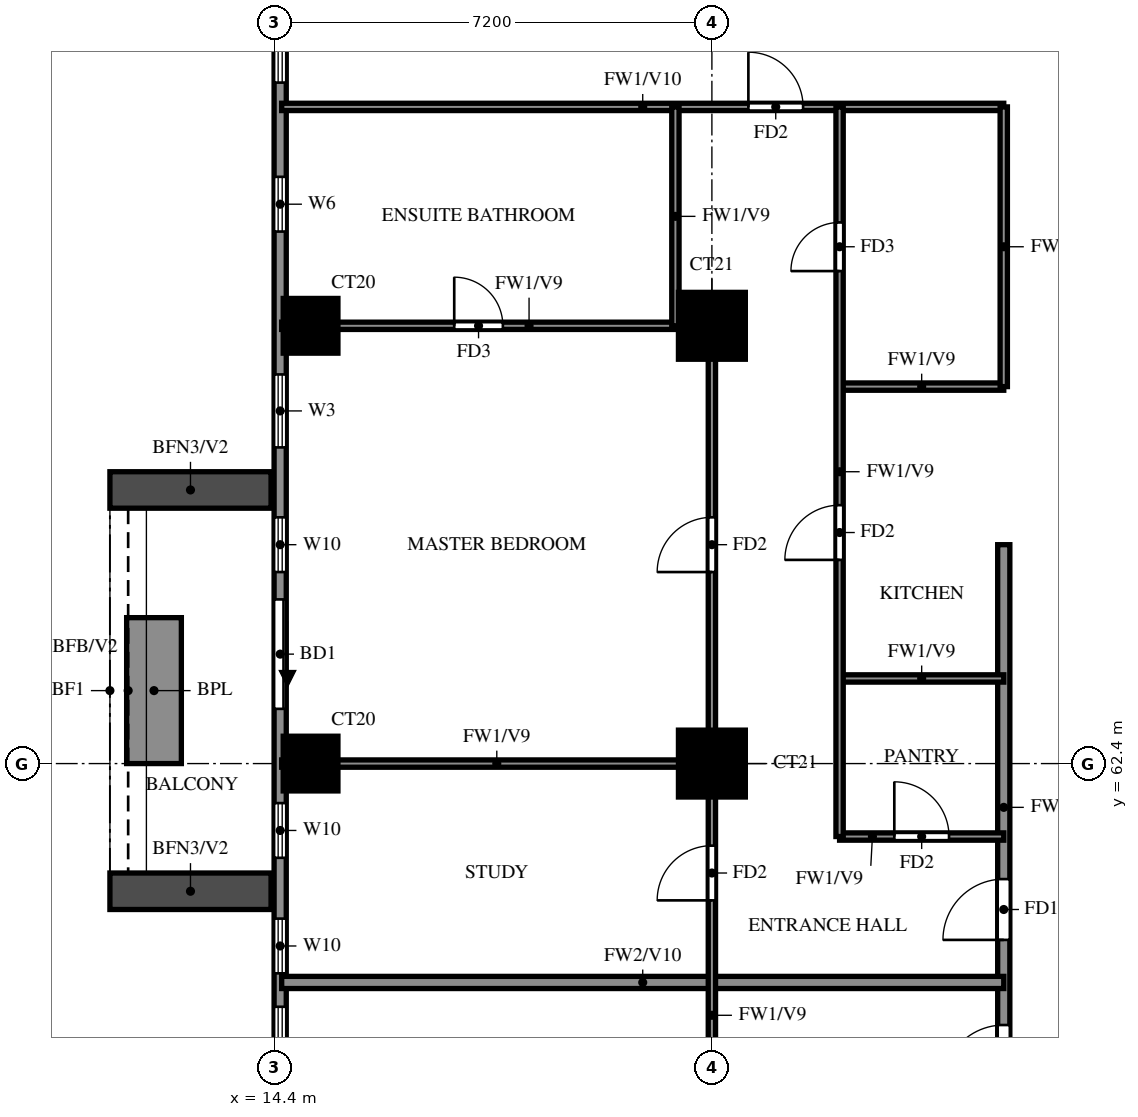
"""IFC4 building model, lengths in metres.
Left out: names, types, materials, properties, quantities, classifications, styles, units other than length and angle.
Written with IfcOpenShell. Run it as: python <this file> out.ifc"""

import sys

from ifc_helpers import new_model, si_unit, direction, frame, frame_2d, origin, origin_2d, place, context, subcontext, project, spatial, rectangle, extrude, source, transform, mapped, element, fill, save


model = new_model("IFC4")
c1 = context("Model", 3, precision=1e-05, world=origin(), true_north=direction((0.0, 1.0)))
c2 = subcontext(c1, "Body", "Model", "MODEL_VIEW")
j1 = project(units=[si_unit("LENGTHUNIT", "METRE"), si_unit("PLANEANGLEUNIT", "RADIAN")], contexts=[c1])
p1 = place(None, origin())
s1 = spatial("IfcSite", under=j1, at=p1, CompositionType="ELEMENT")
p2 = place(p1, origin())
s2 = spatial("IfcBuilding", under=s1, at=p2, CompositionType="ELEMENT")
p3 = place(p2, frame((0.0, 0.0, 134.0)))
s3 = spatial("IfcBuildingStorey", under=s2, at=p3, CompositionType="ELEMENT", Elevation=134.0)
m1 = source(origin(), c2, "Body", "SweptSolid", [
    extrude(rectangle(XDim=0.9, YDim=0.9, at=origin_2d()), origin(), (0.0, 0.0, 1.0), 3.15),
])
p4 = place(p3, frame((15.0, 62.4, 0.0), z_axis=(0.0, 0.0, 1.0), x_axis=(1.0, 0.0, 0.0)))
e1 = element("IfcColumn", 1, at=p4, inside=s3, PredefinedType="COLUMN", context=c2, shape_type="MappedRepresentation", body=[
    mapped(m1, transform((0.0, 0.0, 0.0))),
])
m2 = source(origin(), c2, "Body", "SweptSolid", [
    extrude(rectangle(XDim=1.1, YDim=1.1, at=origin_2d()), origin(), (0.0, 0.0, 1.0), 3.15),
])
p5 = place(p3, frame((21.6, 62.4, 0.0), z_axis=(0.0, 0.0, 1.0), x_axis=(1.0, 0.0, 0.0)))
e2 = element("IfcColumn", 2, at=p5, inside=s3, PredefinedType="COLUMN", context=c2, shape_type="MappedRepresentation", body=[
    mapped(m2, transform((0.0, 0.0, 0.0))),
])
p6 = place(p3, frame((15.0, 69.6, 0.0), z_axis=(0.0, 0.0, 1.0), x_axis=(1.0, 0.0, 0.0)))
e3 = element("IfcColumn", 3, at=p6, inside=s3, PredefinedType="COLUMN", context=c2, shape_type="MappedRepresentation", body=[
    mapped(m1, transform((0.0, 0.0, 0.0))),
])
p7 = place(p3, frame((21.6, 69.6, 0.0), z_axis=(0.0, 0.0, 1.0), x_axis=(1.0, 0.0, 0.0)))
e4 = element("IfcColumn", 4, at=p7, inside=s3, PredefinedType="COLUMN", context=c2, shape_type="MappedRepresentation", body=[
    mapped(m2, transform((0.0, 0.0, 0.0))),
])
p8 = place(p3, frame((14.5, 76.6, 0.0), z_axis=(0.0, 0.0, 1.0), x_axis=(0.0, -1.0, 0.0)))
e5 = element("IfcWall", 5, at=p8, inside=s3, PredefinedType="SOLIDWALL", context=c2, shape_type="SweptSolid", body=[
    extrude(rectangle(XDim=33.4, YDim=0.2, at=frame_2d((16.7, 0.0))), origin(), (0.0, 0.0, 1.0), 3.15),
])
p9 = place(p8, frame((11.5, 0.0, 0.0)))
e6 = element("IfcOpeningElement", 6, at=p9, cuts=e5, PredefinedType="OPENING", context=c2, shape_type="SweptSolid", body=[
    extrude(rectangle(XDim=1.8, YDim=2.4, at=frame_2d((0.9, 1.2))), frame((0.0, 0.11, 0.0), z_axis=(0.0, -1.0, 0.0), x_axis=(1.0, 0.0, 0.0)), (0.0, 0.0, 1.0), 0.22),
])
p10 = place(p8, frame((25.9, 0.0, 0.0)))
e7 = element("IfcOpeningElement", 7, at=p10, cuts=e5, PredefinedType="OPENING", context=c2, shape_type="SweptSolid", body=[
    extrude(rectangle(XDim=1.8, YDim=2.4, at=frame_2d((0.9, 1.2))), frame((0.0, 0.11, 0.0), z_axis=(0.0, -1.0, 0.0), x_axis=(1.0, 0.0, 0.0)), (0.0, 0.0, 1.0), 0.22),
])
p11 = place(p8, frame((29.25, 0.0, 0.6)))
e8 = element("IfcOpeningElement", 8, at=p11, cuts=e5, PredefinedType="OPENING", context=c2, shape_type="SweptSolid", body=[
    extrude(rectangle(XDim=0.9, YDim=2.4, at=frame_2d((0.45, 1.2))), frame((0.0, 0.11, 0.0), z_axis=(0.0, -1.0, 0.0), x_axis=(1.0, 0.0, 0.0)), (0.0, 0.0, 1.0), 0.22),
])
p12 = place(p8, frame((31.2, 0.0, 0.6)))
e9 = element("IfcOpeningElement", 9, at=p12, cuts=e5, PredefinedType="OPENING", context=c2, shape_type="SweptSolid", body=[
    extrude(rectangle(XDim=1.8, YDim=2.4, at=frame_2d((0.9, 1.2))), frame((0.0, 0.11, 0.0), z_axis=(0.0, -1.0, 0.0), x_axis=(1.0, 0.0, 0.0)), (0.0, 0.0, 1.0), 0.22),
])
p13 = place(p8, frame((18.2, 0.0, 0.6)))
e10 = element("IfcOpeningElement", 10, at=p13, cuts=e5, PredefinedType="OPENING", context=c2, shape_type="SweptSolid", body=[
    extrude(rectangle(XDim=2.4, YDim=2.4, at=frame_2d((1.2, 1.2))), frame((0.0, 0.11, 0.0), z_axis=(0.0, -1.0, 0.0), x_axis=(1.0, 0.0, 0.0)), (0.0, 0.0, 1.0), 0.22),
])
p14 = place(p8, frame((22.2, 0.0, 0.6)))
e11 = element("IfcOpeningElement", 11, at=p14, cuts=e5, PredefinedType="OPENING", context=c2, shape_type="SweptSolid", body=[
    extrude(rectangle(XDim=1.2, YDim=2.4, at=frame_2d((0.6, 1.2))), frame((0.0, 0.11, 0.0), z_axis=(0.0, -1.0, 0.0), x_axis=(1.0, 0.0, 0.0)), (0.0, 0.0, 1.0), 0.22),
])
p15 = place(p8, frame((14.85, 0.0, 0.6)))
e12 = element("IfcOpeningElement", 12, at=p15, cuts=e5, PredefinedType="OPENING", context=c2, shape_type="SweptSolid", body=[
    extrude(rectangle(XDim=0.9, YDim=2.4, at=frame_2d((0.45, 1.2))), frame((0.0, 0.11, 0.0), z_axis=(0.0, -1.0, 0.0), x_axis=(1.0, 0.0, 0.0)), (0.0, 0.0, 1.0), 0.22),
])
p16 = place(p8, frame((16.75, 0.0, 0.6)))
e13 = element("IfcOpeningElement", 13, at=p16, cuts=e5, PredefinedType="OPENING", context=c2, shape_type="SweptSolid", body=[
    extrude(rectangle(XDim=0.9, YDim=2.4, at=frame_2d((0.45, 1.2))), frame((0.0, 0.11, 0.0), z_axis=(0.0, -1.0, 0.0), x_axis=(1.0, 0.0, 0.0)), (0.0, 0.0, 1.0), 0.22),
])
p17 = place(p8, frame((7.8, 0.0, 0.6)))
e14 = element("IfcOpeningElement", 14, at=p17, cuts=e5, PredefinedType="OPENING", context=c2, shape_type="SweptSolid", body=[
    extrude(rectangle(XDim=1.2, YDim=2.4, at=frame_2d((0.6, 1.2))), frame((0.0, 0.11, 0.0), z_axis=(0.0, -1.0, 0.0), x_axis=(1.0, 0.0, 0.0)), (0.0, 0.0, 1.0), 0.22),
])
p18 = place(p8, frame((10.15, 0.0, 0.6)))
e15 = element("IfcOpeningElement", 15, at=p18, cuts=e5, PredefinedType="OPENING", context=c2, shape_type="SweptSolid", body=[
    extrude(rectangle(XDim=0.9, YDim=2.4, at=frame_2d((0.45, 1.2))), frame((0.0, 0.11, 0.0), z_axis=(0.0, -1.0, 0.0), x_axis=(1.0, 0.0, 0.0)), (0.0, 0.0, 1.0), 0.22),
])
p19 = place(p8, frame((4.55, 0.0, 1.5)))
e16 = element("IfcOpeningElement", 16, at=p19, cuts=e5, PredefinedType="OPENING", context=c2, shape_type="SweptSolid", body=[
    extrude(rectangle(XDim=0.9, YDim=0.9, at=frame_2d((0.45, 0.45))), frame((0.0, 0.11, 0.0), z_axis=(0.0, -1.0, 0.0), x_axis=(1.0, 0.0, 0.0)), (0.0, 0.0, 1.0), 0.22),
])
p20 = place(p8, frame((0.6, 0.0, 0.6)))
e17 = element("IfcOpeningElement", 17, at=p20, cuts=e5, PredefinedType="OPENING", context=c2, shape_type="SweptSolid", body=[
    extrude(rectangle(XDim=2.4, YDim=2.4, at=frame_2d((1.2, 1.2))), frame((0.0, 0.11, 0.0), z_axis=(0.0, -1.0, 0.0), x_axis=(1.0, 0.0, 0.0)), (0.0, 0.0, 1.0), 0.22),
])
for number, where, z_axis, x_axis in (
    (18, (14.35, 66.9, 0.0), (0.0, 0.0, 1.0), (-1.0, 0.0, 0.0)),
    (19, (14.35, 60.3, 0.0), (0.0, 0.0, 1.0), (-1.0, 0.0, 0.0)),
):
    element("IfcWall", number, at=place(p3, frame(where, z_axis=z_axis, x_axis=x_axis)), inside=s3, PredefinedType="SOLIDWALL", context=c2, shape_type="SweptSolid", body=[
        extrude(rectangle(XDim=2.65, YDim=0.6, at=frame_2d((1.325, 0.0))), origin(), (0.0, 0.0, 1.0), 2.8),
    ])
p21 = place(p3, frame((12.425, 64.8, 0.0), z_axis=(0.0, 0.0, 1.0), x_axis=(0.0, -1.0, 0.0)))
e20 = element("IfcWall", 20, at=p21, inside=s3, PredefinedType="SOLIDWALL", context=c2, shape_type="SweptSolid", body=[
    extrude(rectangle(XDim=2.4, YDim=0.9, at=frame_2d((1.2, 0.0))), origin(), (0.0, 0.0, 1.0), 0.9),
])
p22 = place(p3, frame((26.4, 56.4, 0.0), z_axis=(0.0, 0.0, 1.0), x_axis=(0.0, 1.0, 0.0)))
e21 = element("IfcWall", 21, at=p22, inside=s3, PredefinedType="SOLIDWALL", context=c2, shape_type="SweptSolid", body=[
    extrude(rectangle(XDim=9.6, YDim=0.2, at=frame_2d((4.8, 0.0))), origin(), (0.0, 0.0, 1.0), 3.15),
])
p23 = place(p22, frame((0.7, 0.0, 0.0)))
e22 = element("IfcOpeningElement", 22, at=p23, cuts=e21, PredefinedType="OPENING", context=c2, shape_type="SweptSolid", body=[
    extrude(rectangle(XDim=1.0, YDim=2.1, at=frame_2d((0.5, 1.05))), frame((0.0, 0.11, 0.0), z_axis=(0.0, -1.0, 0.0), x_axis=(1.0, 0.0, 0.0)), (0.0, 0.0, 1.0), 0.22),
])
p24 = place(p22, frame((3.1, 0.0, 0.0)))
e23 = element("IfcOpeningElement", 23, at=p24, cuts=e21, PredefinedType="OPENING", context=c2, shape_type="SweptSolid", body=[
    extrude(rectangle(XDim=1.0, YDim=2.1, at=frame_2d((0.5, 1.05))), frame((0.0, 0.11, 0.0), z_axis=(0.0, -1.0, 0.0), x_axis=(1.0, 0.0, 0.0)), (0.0, 0.0, 1.0), 0.22),
])
p25 = place(p3, frame((14.525, 58.8, 0.0), z_axis=(0.0, 0.0, 1.0), x_axis=(1.0, 0.0, 0.0)))
e24 = element("IfcWall", 24, at=p25, inside=s3, PredefinedType="SOLIDWALL", context=c2, shape_type="SweptSolid", body=[
    extrude(rectangle(XDim=11.875, YDim=0.2, at=frame_2d((5.938, 0.0))), origin(), (0.0, 0.0, 1.0), 2.25),
])
p26 = place(p3, frame((23.7, 61.2, 0.0), z_axis=(0.0, 0.0, 1.0), x_axis=(1.0, 0.0, 0.0)))
e25 = element("IfcWall", 25, at=p26, inside=s3, PredefinedType="PARTITIONING", context=c2, shape_type="SweptSolid", body=[
    extrude(rectangle(XDim=2.7, YDim=0.12, at=frame_2d((1.35, 0.0))), origin(), (0.0, 0.0, 1.0), 3.15),
])
p27 = place(p26, frame((0.9, 0.0, 0.0)))
e26 = element("IfcOpeningElement", 26, at=p27, cuts=e25, PredefinedType="OPENING", context=c2, shape_type="SweptSolid", body=[
    extrude(rectangle(XDim=0.9, YDim=2.1, at=frame_2d((0.45, 1.05))), frame((0.0, 0.07, 0.0), z_axis=(0.0, -1.0, 0.0), x_axis=(1.0, 0.0, 0.0)), (0.0, 0.0, 1.0), 0.14),
])
p28 = place(p3, frame((14.525, 62.4, 0.0), z_axis=(0.0, 0.0, 1.0), x_axis=(1.0, 0.0, 0.0)))
e27 = element("IfcWall", 27, at=p28, inside=s3, PredefinedType="PARTITIONING", context=c2, shape_type="SweptSolid", body=[
    extrude(rectangle(XDim=7.075, YDim=0.12, at=frame_2d((3.538, 0.0))), origin(), (0.0, 0.0, 1.0), 3.15),
])
for number, where, z_axis, x_axis in (
    (28, (23.7, 63.8, 0.0), (0.0, 0.0, 1.0), (1.0, 0.0, 0.0)),
    (29, (23.7, 68.6, 0.0), (0.0, 0.0, 1.0), (1.0, 0.0, 0.0)),
):
    element("IfcWall", number, at=place(p3, frame(where, z_axis=z_axis, x_axis=x_axis)), inside=s3, PredefinedType="PARTITIONING", context=c2, shape_type="SweptSolid", body=[
        extrude(rectangle(XDim=2.7, YDim=0.12, at=frame_2d((1.35, 0.0))), origin(), (0.0, 0.0, 1.0), 3.15),
    ])
p29 = place(p3, frame((14.525, 69.6, 0.0), z_axis=(0.0, 0.0, 1.0), x_axis=(1.0, 0.0, 0.0)))
e30 = element("IfcWall", 30, at=p29, inside=s3, PredefinedType="PARTITIONING", context=c2, shape_type="SweptSolid", body=[
    extrude(rectangle(XDim=7.075, YDim=0.12, at=frame_2d((3.538, 0.0))), origin(), (0.0, 0.0, 1.0), 3.15),
])
p30 = place(p29, frame((2.837, 0.0, 0.0)))
e31 = element("IfcOpeningElement", 31, at=p30, cuts=e30, PredefinedType="OPENING", context=c2, shape_type="SweptSolid", body=[
    extrude(rectangle(XDim=0.8, YDim=2.1, at=frame_2d((0.4, 1.05))), frame((0.0, 0.07, 0.0), z_axis=(0.0, -1.0, 0.0), x_axis=(1.0, 0.0, 0.0)), (0.0, 0.0, 1.0), 0.14),
])
p31 = place(p3, frame((14.525, 73.2, 0.0), z_axis=(0.0, 0.0, 1.0), x_axis=(1.0, 0.0, 0.0)))
e32 = element("IfcWall", 32, at=p31, inside=s3, PredefinedType="PARTITIONING", context=c2, shape_type="SweptSolid", body=[
    extrude(rectangle(XDim=11.875, YDim=0.12, at=frame_2d((5.938, 0.0))), origin(), (0.0, 0.0, 1.0), 2.25),
])
p32 = place(p31, frame((7.675, 0.0, 0.0)))
e33 = element("IfcOpeningElement", 33, at=p32, cuts=e32, PredefinedType="OPENING", context=c2, shape_type="SweptSolid", body=[
    extrude(rectangle(XDim=0.9, YDim=2.1, at=frame_2d((0.45, 1.05))), frame((0.0, 0.07, 0.0), z_axis=(0.0, -1.0, 0.0), x_axis=(1.0, 0.0, 0.0)), (0.0, 0.0, 1.0), 0.14),
])
p33 = place(p3, frame((21.0, 69.6, 0.0), z_axis=(0.0, 0.0, 1.0), x_axis=(0.0, 1.0, 0.0)))
e34 = element("IfcWall", 34, at=p33, inside=s3, PredefinedType="PARTITIONING", context=c2, shape_type="SweptSolid", body=[
    extrude(rectangle(XDim=3.6, YDim=0.12, at=frame_2d((1.8, 0.0))), origin(), (0.0, 0.0, 1.0), 3.15),
])
p34 = place(p3, frame((21.6, 48.0, 0.0), z_axis=(0.0, 0.0, 1.0), x_axis=(0.0, 1.0, 0.0)))
e35 = element("IfcWall", 35, at=p34, inside=s3, PredefinedType="PARTITIONING", context=c2, shape_type="SweptSolid", body=[
    extrude(rectangle(XDim=21.6, YDim=0.12, at=frame_2d((10.8, 0.0))), origin(), (0.0, 0.0, 1.0), 3.15),
])
p35 = place(p34, frame((1.35, 0.0, 0.0)))
e36 = element("IfcOpeningElement", 36, at=p35, cuts=e35, PredefinedType="OPENING", context=c2, shape_type="SweptSolid", body=[
    extrude(rectangle(XDim=0.9, YDim=2.1, at=frame_2d((0.45, 1.05))), frame((0.0, 0.07, 0.0), z_axis=(0.0, -1.0, 0.0), x_axis=(1.0, 0.0, 0.0)), (0.0, 0.0, 1.0), 0.14),
])
p36 = place(p34, frame((7.95, 0.0, 0.0)))
e37 = element("IfcOpeningElement", 37, at=p36, cuts=e35, PredefinedType="OPENING", context=c2, shape_type="SweptSolid", body=[
    extrude(rectangle(XDim=1.5, YDim=2.1, at=frame_2d((0.75, 1.05))), frame((0.0, 0.07, 0.0), z_axis=(0.0, -1.0, 0.0), x_axis=(1.0, 0.0, 0.0)), (0.0, 0.0, 1.0), 0.14),
])
p37 = place(p34, frame((12.15, 0.0, 0.0)))
e38 = element("IfcOpeningElement", 38, at=p37, cuts=e35, PredefinedType="OPENING", context=c2, shape_type="SweptSolid", body=[
    extrude(rectangle(XDim=0.9, YDim=2.1, at=frame_2d((0.45, 1.05))), frame((0.0, 0.07, 0.0), z_axis=(0.0, -1.0, 0.0), x_axis=(1.0, 0.0, 0.0)), (0.0, 0.0, 1.0), 0.14),
])
p38 = place(p34, frame((17.55, 0.0, 0.0)))
e39 = element("IfcOpeningElement", 39, at=p38, cuts=e35, PredefinedType="OPENING", context=c2, shape_type="SweptSolid", body=[
    extrude(rectangle(XDim=0.9, YDim=2.1, at=frame_2d((0.45, 1.05))), frame((0.0, 0.07, 0.0), z_axis=(0.0, -1.0, 0.0), x_axis=(1.0, 0.0, 0.0)), (0.0, 0.0, 1.0), 0.14),
])
p39 = place(p3, frame((23.7, 61.2, 0.0), z_axis=(0.0, 0.0, 1.0), x_axis=(0.0, 1.0, 0.0)))
e40 = element("IfcWall", 40, at=p39, inside=s3, PredefinedType="PARTITIONING", context=c2, shape_type="SweptSolid", body=[
    extrude(rectangle(XDim=12.0, YDim=0.12, at=frame_2d((6.0, 0.0))), origin(), (0.0, 0.0, 1.0), 3.15),
])
p40 = place(p39, frame((4.55, 0.0, 0.0)))
e41 = element("IfcOpeningElement", 41, at=p40, cuts=e40, PredefinedType="OPENING", context=c2, shape_type="SweptSolid", body=[
    extrude(rectangle(XDim=0.9, YDim=2.1, at=frame_2d((0.45, 1.05))), frame((0.0, 0.07, 0.0), z_axis=(0.0, -1.0, 0.0), x_axis=(1.0, 0.0, 0.0)), (0.0, 0.0, 1.0), 0.14),
])
p41 = place(p39, frame((9.3, 0.0, 0.0)))
e42 = element("IfcOpeningElement", 42, at=p41, cuts=e40, PredefinedType="OPENING", context=c2, shape_type="SweptSolid", body=[
    extrude(rectangle(XDim=0.8, YDim=2.1, at=frame_2d((0.4, 1.05))), frame((0.0, 0.07, 0.0), z_axis=(0.0, -1.0, 0.0), x_axis=(1.0, 0.0, 0.0)), (0.0, 0.0, 1.0), 0.14),
])
p42 = place(p3, frame((26.4, 68.6, 0.0), z_axis=(0.0, 0.0, 1.0), x_axis=(0.0, 1.0, 0.0)))
e43 = element("IfcWall", 43, at=p42, inside=s3, PredefinedType="PARTITIONING", context=c2, shape_type="SweptSolid", body=[
    extrude(rectangle(XDim=4.6, YDim=0.12, at=frame_2d((2.3, 0.0))), origin(), (0.0, 0.0, 1.0), 3.15),
])
p43 = place(p9, origin())
e44 = element("IfcDoor", 44, at=p43, inside=s3, OperationType="DOUBLE_DOOR_SLIDING", PredefinedType="DOOR", context=c2, shape_type="SweptSolid", body=[
    extrude(rectangle(XDim=1.8, YDim=2.4, at=frame_2d((0.9, 1.2))), frame((0.0, 0.025, 0.0), z_axis=(0.0, -1.0, 0.0), x_axis=(1.0, 0.0, 0.0)), (0.0, 0.0, 1.0), 0.05),
])
fill(e6, e44)
p44 = place(p13, origin())
e45 = element("IfcWindow", 45, at=p44, inside=s3, PartitioningType="DOUBLE_PANEL_VERTICAL", PredefinedType="WINDOW", context=c2, shape_type="SweptSolid", body=[
    extrude(rectangle(XDim=2.4, YDim=2.4, at=frame_2d((1.2, 1.2))), frame((0.0, 0.03, 0.0), z_axis=(0.0, -1.0, 0.0), x_axis=(1.0, 0.0, 0.0)), (0.0, 0.0, 1.0), 0.06),
])
fill(e10, e45)
p45 = place(p15, origin())
e46 = element("IfcWindow", 46, at=p45, inside=s3, PartitioningType="SINGLE_PANEL", PredefinedType="WINDOW", context=c2, shape_type="SweptSolid", body=[
    extrude(rectangle(XDim=0.9, YDim=2.4, at=frame_2d((0.45, 1.2))), frame((0.0, 0.03, 0.0), z_axis=(0.0, -1.0, 0.0), x_axis=(1.0, 0.0, 0.0)), (0.0, 0.0, 1.0), 0.06),
])
fill(e12, e46)
p46 = place(p16, origin())
e47 = element("IfcWindow", 47, at=p46, inside=s3, PartitioningType="SINGLE_PANEL", PredefinedType="WINDOW", context=c2, shape_type="SweptSolid", body=[
    extrude(rectangle(XDim=0.9, YDim=2.4, at=frame_2d((0.45, 1.2))), frame((0.0, 0.03, 0.0), z_axis=(0.0, -1.0, 0.0), x_axis=(1.0, 0.0, 0.0)), (0.0, 0.0, 1.0), 0.06),
])
fill(e13, e47)
p47 = place(p17, origin())
e48 = element("IfcWindow", 48, at=p47, inside=s3, PartitioningType="SINGLE_PANEL", PredefinedType="WINDOW", context=c2, shape_type="SweptSolid", body=[
    extrude(rectangle(XDim=1.2, YDim=2.4, at=frame_2d((0.6, 1.2))), frame((0.0, 0.03, 0.0), z_axis=(0.0, -1.0, 0.0), x_axis=(1.0, 0.0, 0.0)), (0.0, 0.0, 1.0), 0.06),
])
fill(e14, e48)
p48 = place(p18, origin())
e49 = element("IfcWindow", 49, at=p48, inside=s3, PartitioningType="SINGLE_PANEL", PredefinedType="WINDOW", context=c2, shape_type="SweptSolid", body=[
    extrude(rectangle(XDim=0.9, YDim=2.4, at=frame_2d((0.45, 1.2))), frame((0.0, 0.03, 0.0), z_axis=(0.0, -1.0, 0.0), x_axis=(1.0, 0.0, 0.0)), (0.0, 0.0, 1.0), 0.06),
])
fill(e15, e49)
p49 = place(p19, origin())
e50 = element("IfcWindow", 50, at=p49, inside=s3, PartitioningType="SINGLE_PANEL", PredefinedType="WINDOW", context=c2, shape_type="SweptSolid", body=[
    extrude(rectangle(XDim=0.9, YDim=0.9, at=frame_2d((0.45, 0.45))), frame((0.0, 0.03, 0.0), z_axis=(0.0, -1.0, 0.0), x_axis=(1.0, 0.0, 0.0)), (0.0, 0.0, 1.0), 0.06),
])
fill(e16, e50)
p50 = place(p20, origin())
e51 = element("IfcWindow", 51, at=p50, inside=s3, PartitioningType="DOUBLE_PANEL_VERTICAL", PredefinedType="WINDOW", context=c2, shape_type="SweptSolid", body=[
    extrude(rectangle(XDim=2.4, YDim=2.4, at=frame_2d((1.2, 1.2))), frame((0.0, 0.03, 0.0), z_axis=(0.0, -1.0, 0.0), x_axis=(1.0, 0.0, 0.0)), (0.0, 0.0, 1.0), 0.06),
])
fill(e17, e51)
p51 = place(p23, origin())
e52 = element("IfcDoor", 52, at=p51, inside=s3, OperationType="SINGLE_SWING_LEFT", PredefinedType="DOOR", context=c2, shape_type="SweptSolid", body=[
    extrude(rectangle(XDim=1.0, YDim=2.1, at=frame_2d((0.5, 1.05))), frame((0.0, 0.025, 0.0), z_axis=(0.0, -1.0, 0.0), x_axis=(1.0, 0.0, 0.0)), (0.0, 0.0, 1.0), 0.05),
])
fill(e22, e52)
p52 = place(p24, origin())
e53 = element("IfcDoor", 53, at=p52, inside=s3, OperationType="SINGLE_SWING_LEFT", PredefinedType="DOOR", context=c2, shape_type="SweptSolid", body=[
    extrude(rectangle(XDim=1.0, YDim=2.1, at=frame_2d((0.5, 1.05))), frame((0.0, 0.025, 0.0), z_axis=(0.0, -1.0, 0.0), x_axis=(1.0, 0.0, 0.0)), (0.0, 0.0, 1.0), 0.05),
])
fill(e23, e53)
p53 = place(p37, origin())
e54 = element("IfcDoor", 54, at=p53, inside=s3, OperationType="SINGLE_SWING_LEFT", PredefinedType="DOOR", context=c2, shape_type="SweptSolid", body=[
    extrude(rectangle(XDim=0.9, YDim=2.1, at=frame_2d((0.45, 1.05))), frame((0.0, 0.025, 0.0), z_axis=(0.0, -1.0, 0.0), x_axis=(1.0, 0.0, 0.0)), (0.0, 0.0, 1.0), 0.05),
])
fill(e38, e54)
p54 = place(p38, origin())
e55 = element("IfcDoor", 55, at=p54, inside=s3, OperationType="SINGLE_SWING_RIGHT", PredefinedType="DOOR", context=c2, shape_type="SweptSolid", body=[
    extrude(rectangle(XDim=0.9, YDim=2.1, at=frame_2d((0.45, 1.05))), frame((0.0, 0.025, 0.0), z_axis=(0.0, -1.0, 0.0), x_axis=(1.0, 0.0, 0.0)), (0.0, 0.0, 1.0), 0.05),
])
fill(e39, e55)
p55 = place(p30, origin())
e56 = element("IfcDoor", 56, at=p55, inside=s3, OperationType="SINGLE_SWING_LEFT", PredefinedType="DOOR", context=c2, shape_type="SweptSolid", body=[
    extrude(rectangle(XDim=0.8, YDim=2.1, at=frame_2d((0.4, 1.05))), frame((0.0, 0.025, 0.0), z_axis=(0.0, -1.0, 0.0), x_axis=(1.0, 0.0, 0.0)), (0.0, 0.0, 1.0), 0.05),
])
fill(e31, e56)
p56 = place(p32, origin())
e57 = element("IfcDoor", 57, at=p56, inside=s3, OperationType="SINGLE_SWING_LEFT", PredefinedType="DOOR", context=c2, shape_type="SweptSolid", body=[
    extrude(rectangle(XDim=0.9, YDim=2.1, at=frame_2d((0.45, 1.05))), frame((0.0, 0.025, 0.0), z_axis=(0.0, -1.0, 0.0), x_axis=(1.0, 0.0, 0.0)), (0.0, 0.0, 1.0), 0.05),
])
fill(e33, e57)
p57 = place(p27, origin())
e58 = element("IfcDoor", 58, at=p57, inside=s3, OperationType="SINGLE_SWING_RIGHT", PredefinedType="DOOR", context=c2, shape_type="SweptSolid", body=[
    extrude(rectangle(XDim=0.9, YDim=2.1, at=frame_2d((0.45, 1.05))), frame((0.0, 0.025, 0.0), z_axis=(0.0, -1.0, 0.0), x_axis=(1.0, 0.0, 0.0)), (0.0, 0.0, 1.0), 0.05),
])
fill(e26, e58)
p58 = place(p40, origin())
e59 = element("IfcDoor", 59, at=p58, inside=s3, OperationType="SINGLE_SWING_LEFT", PredefinedType="DOOR", context=c2, shape_type="SweptSolid", body=[
    extrude(rectangle(XDim=0.9, YDim=2.1, at=frame_2d((0.45, 1.05))), frame((0.0, 0.025, 0.0), z_axis=(0.0, -1.0, 0.0), x_axis=(1.0, 0.0, 0.0)), (0.0, 0.0, 1.0), 0.05),
])
fill(e41, e59)
p59 = place(p41, origin())
e60 = element("IfcDoor", 60, at=p59, inside=s3, OperationType="SINGLE_SWING_LEFT", PredefinedType="DOOR", context=c2, shape_type="SweptSolid", body=[
    extrude(rectangle(XDim=0.8, YDim=2.1, at=frame_2d((0.4, 1.05))), frame((0.0, 0.025, 0.0), z_axis=(0.0, -1.0, 0.0), x_axis=(1.0, 0.0, 0.0)), (0.0, 0.0, 1.0), 0.05),
])
fill(e42, e60)
save(model, sys.argv[1])
